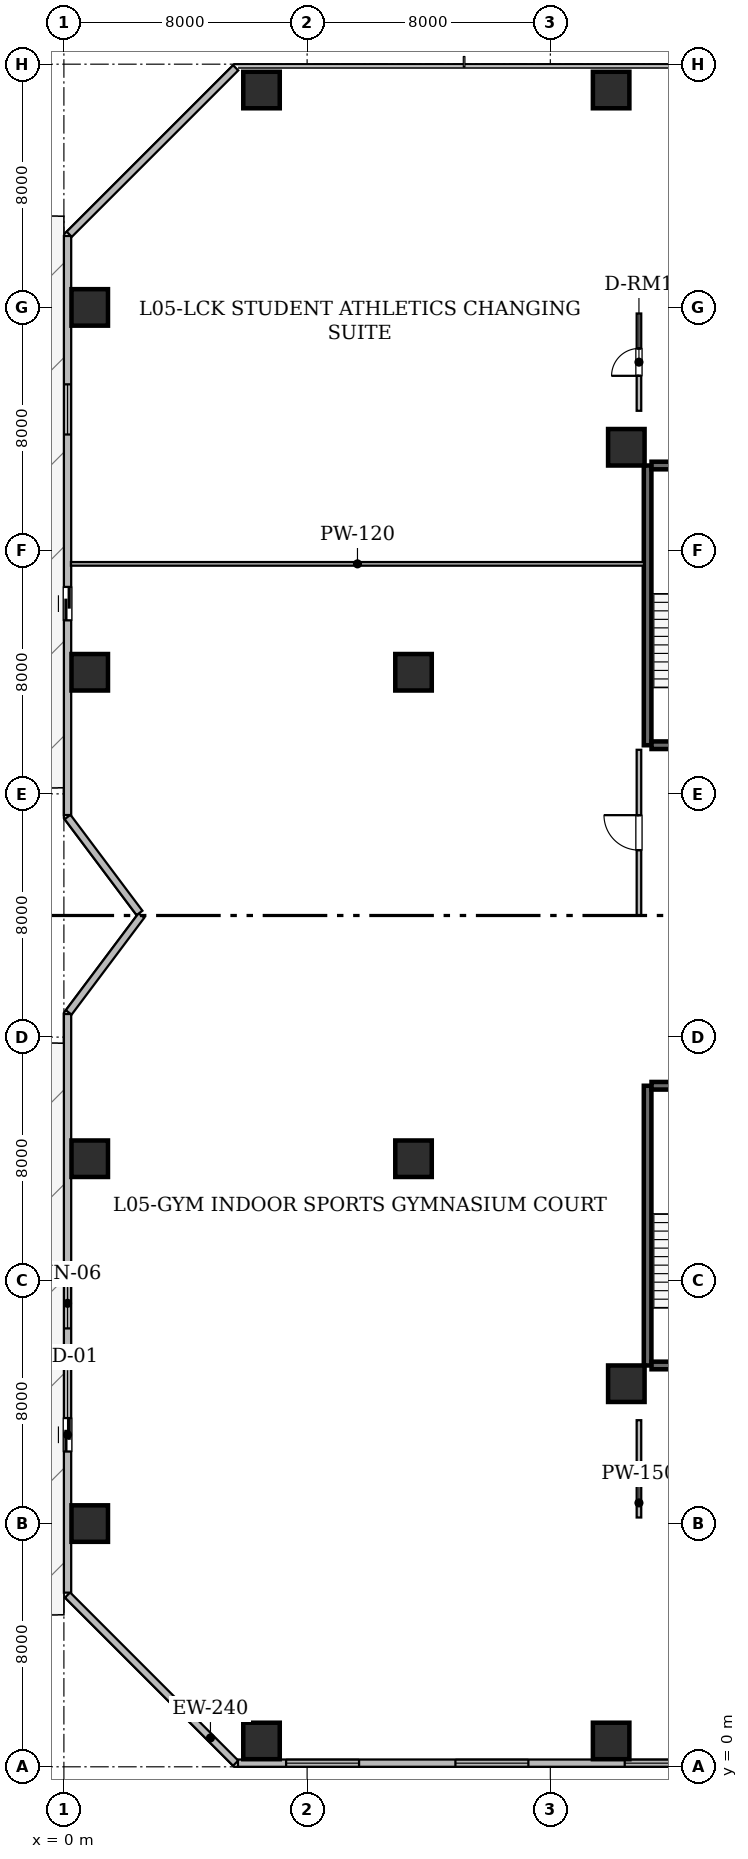
"""IFC4 building model, lengths in metres.
Left out: names, types, materials, properties, quantities, classifications, styles, units other than length and angle.
Written with IfcOpenShell. Run it as: python <this file> out.ifc"""

import sys

from ifc_helpers import new_model, si_unit, direction, frame, frame_2d, origin, origin_2d, place, context, subcontext, project, spatial, rectangle, hollow_rectangle, extrude, element, fill, save


model = new_model("IFC4")
c1 = context("Model", 3, precision=1e-05, world=origin(), true_north=direction((0.0, 1.0)))
c2 = subcontext(c1, "Body", "Model", "MODEL_VIEW")
j1 = project(units=[si_unit("LENGTHUNIT", "METRE"), si_unit("PLANEANGLEUNIT", "RADIAN")], contexts=[c1])
p1 = place(None, origin())
s1 = spatial("IfcSite", under=j1, at=p1, CompositionType="ELEMENT")
p2 = place(p1, origin())
s2 = spatial("IfcBuilding", under=s1, at=p2, CompositionType="ELEMENT")
p3 = place(p2, frame((0.0, 0.0, 24.6)))
s3 = spatial("IfcBuildingStorey", under=s2, at=p3, CompositionType="ELEMENT", Elevation=24.6)
for number, where, z_axis, x_axis in (
    (1, (6.5, 0.85, 0.0), (0.0, 0.0, 1.0), (1.0, 0.0, 0.0)),
    (2, (18.0, 0.85, 0.0), (0.0, 0.0, 1.0), (1.0, 0.0, 0.0)),
    (3, (6.5, 55.15, 0.0), (0.0, 0.0, 1.0), (1.0, 0.0, 0.0)),
    (4, (18.0, 55.15, 0.0), (0.0, 0.0, 1.0), (1.0, 0.0, 0.0)),
    (5, (0.85, 8.0, 0.0), (0.0, 0.0, 1.0), (1.0, 0.0, 0.0)),
    (6, (0.85, 20.0, 0.0), (0.0, 0.0, 1.0), (1.0, 0.0, 0.0)),
    (7, (0.85, 36.0, 0.0), (0.0, 0.0, 1.0), (1.0, 0.0, 0.0)),
    (8, (0.85, 48.0, 0.0), (0.0, 0.0, 1.0), (1.0, 0.0, 0.0)),
    (9, (18.5, 12.6, 0.0), (0.0, 0.0, 1.0), (1.0, 0.0, 0.0)),
    (10, (18.5, 43.4, 0.0), (0.0, 0.0, 1.0), (1.0, 0.0, 0.0)),
    (11, (11.5, 20.0, 0.0), (0.0, 0.0, 1.0), (1.0, 0.0, 0.0)),
    (12, (11.5, 36.0, 0.0), (0.0, 0.0, 1.0), (1.0, 0.0, 0.0)),
):
    element("IfcColumn", number, at=place(p3, frame(where, z_axis=z_axis, x_axis=x_axis)), inside=s3, PredefinedType="COLUMN", context=c2, shape_type="SweptSolid", body=[
        extrude(hollow_rectangle(XDim=1.2, YDim=1.2, WallThickness=0.06, at=origin_2d()), origin(), (0.0, 0.0, 1.0), 4.2),
    ])
p4 = place(p3, frame((5.65, 0.12, 0.0), z_axis=(0.0, 0.0, 1.0), x_axis=(-0.707106781187, 0.707106781187, 0.0)))
e13 = element("IfcWall", 13, at=p4, inside=s3, PredefinedType="STANDARD", context=c2, shape_type="SweptSolid", body=[
    extrude(rectangle(XDim=7.82, YDim=0.24, at=frame_2d((3.91, 0.0))), origin(), (0.0, 0.0, 1.0), 3.92),
])
p5 = place(p3, frame((0.12, 5.728, 0.0), z_axis=(0.0, 0.0, 1.0), x_axis=(0.0, 1.0, 0.0)))
e14 = element("IfcWall", 14, at=p5, inside=s3, PredefinedType="STANDARD", context=c2, shape_type="SweptSolid", body=[
    extrude(rectangle(XDim=19.032, YDim=0.24, at=frame_2d((9.516, 0.0))), origin(), (0.0, 0.0, 1.0), 3.92),
])
p6 = place(p5, frame((4.642, 0.0, 0.0)))
e15 = element("IfcOpeningElement", 15, at=p6, cuts=e14, PredefinedType="OPENING", context=c2, shape_type="SweptSolid", body=[
    extrude(rectangle(XDim=1.1, YDim=2.2, at=frame_2d((0.55, 1.1))), frame((0.0, 0.13, 0.0), z_axis=(0.0, -1.0, 0.0), x_axis=(1.0, 0.0, 0.0)), (0.0, 0.0, 1.0), 0.26),
])
p7 = place(p5, frame((8.691, 0.0, 0.85)))
e16 = element("IfcOpeningElement", 16, at=p7, cuts=e14, PredefinedType="OPENING", context=c2, shape_type="SweptSolid", body=[
    extrude(rectangle(XDim=1.65, YDim=1.55, at=frame_2d((0.825, 0.775))), frame((0.0, 0.13, 0.0), z_axis=(0.0, -1.0, 0.0), x_axis=(1.0, 0.0, 0.0)), (0.0, 0.0, 1.0), 0.26),
])
p8 = place(p3, frame((0.158, 24.811, 0.0), z_axis=(0.0, 0.0, 1.0), x_axis=(0.600058791648, 0.799955902889, 0.0)))
e17 = element("IfcWall", 17, at=p8, inside=s3, PredefinedType="STANDARD", context=c2, shape_type="SweptSolid", body=[
    extrude(rectangle(XDim=3.986, YDim=0.24, at=frame_2d((1.993, 0.0))), origin(), (0.0, 0.0, 1.0), 3.92),
])
p9 = place(p3, frame((2.487, 28.084, 0.0), z_axis=(0.0, 0.0, 1.0), x_axis=(-0.599990098106, 0.800007426325, 0.0)))
e18 = element("IfcWall", 18, at=p9, inside=s3, PredefinedType="STANDARD", context=c2, shape_type="SweptSolid", body=[
    extrude(rectangle(XDim=3.945, YDim=0.24, at=frame_2d((1.973, 0.0))), origin(), (0.0, 0.0, 1.0), 3.92),
])
p10 = place(p3, frame((0.12, 31.304, 0.0), z_axis=(0.0, 0.0, 1.0), x_axis=(0.0, 1.0, 0.0)))
e19 = element("IfcWall", 19, at=p10, inside=s3, PredefinedType="STANDARD", context=c2, shape_type="SweptSolid", body=[
    extrude(rectangle(XDim=19.046, YDim=0.24, at=frame_2d((9.523, 0.0))), origin(), (0.0, 0.0, 1.0), 3.92),
])
p11 = place(p10, frame((6.403, 0.0, 0.0)))
e20 = element("IfcOpeningElement", 20, at=p11, cuts=e19, PredefinedType="OPENING", context=c2, shape_type="SweptSolid", body=[
    extrude(rectangle(XDim=1.1, YDim=2.2, at=frame_2d((0.55, 1.1))), frame((0.0, 0.13, 0.0), z_axis=(0.0, -1.0, 0.0), x_axis=(1.0, 0.0, 0.0)), (0.0, 0.0, 1.0), 0.26),
])
p12 = place(p10, frame((12.516, 0.0, 0.85)))
e21 = element("IfcOpeningElement", 21, at=p12, cuts=e19, PredefinedType="OPENING", context=c2, shape_type="SweptSolid", body=[
    extrude(rectangle(XDim=1.65, YDim=1.55, at=frame_2d((0.825, 0.775))), frame((0.0, 0.13, 0.0), z_axis=(0.0, -1.0, 0.0), x_axis=(1.0, 0.0, 0.0)), (0.0, 0.0, 1.0), 0.26),
])
p13 = place(p3, frame((0.175, 50.405, 0.0), z_axis=(0.0, 0.0, 1.0), x_axis=(0.707106781187, 0.707106781187, 0.0)))
e22 = element("IfcWall", 22, at=p13, inside=s3, PredefinedType="STANDARD", context=c2, shape_type="SweptSolid", body=[
    extrude(rectangle(XDim=7.743, YDim=0.24, at=frame_2d((3.871, 0.0))), origin(), (0.0, 0.0, 1.0), 3.92),
])
p14 = place(p3, frame((50.275, 0.12, 0.0), z_axis=(0.0, 0.0, 1.0), x_axis=(-1.0, 0.0, 0.0)))
e23 = element("IfcWall", 23, at=p14, inside=s3, PredefinedType="STANDARD", context=c2, shape_type="SweptSolid", body=[
    extrude(rectangle(XDim=44.55, YDim=0.24, at=frame_2d((22.275, 0.0))), origin(), (0.0, 0.0, 1.0), 3.92),
])
p15 = place(p14, frame((1.584, 0.0, 0.9)))
e24 = element("IfcOpeningElement", 24, at=p15, cuts=e23, PredefinedType="OPENING", context=c2, shape_type="SweptSolid", body=[
    extrude(rectangle(XDim=2.4, YDim=1.7, at=frame_2d((1.2, 0.85))), frame((0.0, 0.13, 0.0), z_axis=(0.0, -1.0, 0.0), x_axis=(1.0, 0.0, 0.0)), (0.0, 0.0, 1.0), 0.26),
])
p16 = place(p14, frame((7.153, 0.0, 0.9)))
e25 = element("IfcOpeningElement", 25, at=p16, cuts=e23, PredefinedType="OPENING", context=c2, shape_type="SweptSolid", body=[
    extrude(rectangle(XDim=2.4, YDim=1.7, at=frame_2d((1.2, 0.85))), frame((0.0, 0.13, 0.0), z_axis=(0.0, -1.0, 0.0), x_axis=(1.0, 0.0, 0.0)), (0.0, 0.0, 1.0), 0.26),
])
p17 = place(p14, frame((12.722, 0.0, 0.9)))
e26 = element("IfcOpeningElement", 26, at=p17, cuts=e23, PredefinedType="OPENING", context=c2, shape_type="SweptSolid", body=[
    extrude(rectangle(XDim=2.4, YDim=1.7, at=frame_2d((1.2, 0.85))), frame((0.0, 0.13, 0.0), z_axis=(0.0, -1.0, 0.0), x_axis=(1.0, 0.0, 0.0)), (0.0, 0.0, 1.0), 0.26),
])
p18 = place(p14, frame((18.291, 0.0, 0.9)))
e27 = element("IfcOpeningElement", 27, at=p18, cuts=e23, PredefinedType="OPENING", context=c2, shape_type="SweptSolid", body=[
    extrude(rectangle(XDim=2.4, YDim=1.7, at=frame_2d((1.2, 0.85))), frame((0.0, 0.13, 0.0), z_axis=(0.0, -1.0, 0.0), x_axis=(1.0, 0.0, 0.0)), (0.0, 0.0, 1.0), 0.26),
])
p19 = place(p14, frame((23.859, 0.0, 0.9)))
e28 = element("IfcOpeningElement", 28, at=p19, cuts=e23, PredefinedType="OPENING", context=c2, shape_type="SweptSolid", body=[
    extrude(rectangle(XDim=2.4, YDim=1.7, at=frame_2d((1.2, 0.85))), frame((0.0, 0.13, 0.0), z_axis=(0.0, -1.0, 0.0), x_axis=(1.0, 0.0, 0.0)), (0.0, 0.0, 1.0), 0.26),
])
p20 = place(p14, frame((29.428, 0.0, 0.9)))
e29 = element("IfcOpeningElement", 29, at=p20, cuts=e23, PredefinedType="OPENING", context=c2, shape_type="SweptSolid", body=[
    extrude(rectangle(XDim=2.4, YDim=1.7, at=frame_2d((1.2, 0.85))), frame((0.0, 0.13, 0.0), z_axis=(0.0, -1.0, 0.0), x_axis=(1.0, 0.0, 0.0)), (0.0, 0.0, 1.0), 0.26),
])
p21 = place(p14, frame((34.997, 0.0, 0.9)))
e30 = element("IfcOpeningElement", 30, at=p21, cuts=e23, PredefinedType="OPENING", context=c2, shape_type="SweptSolid", body=[
    extrude(rectangle(XDim=2.4, YDim=1.7, at=frame_2d((1.2, 0.85))), frame((0.0, 0.13, 0.0), z_axis=(0.0, -1.0, 0.0), x_axis=(1.0, 0.0, 0.0)), (0.0, 0.0, 1.0), 0.26),
])
p22 = place(p14, frame((40.566, 0.0, 0.9)))
e31 = element("IfcOpeningElement", 31, at=p22, cuts=e23, PredefinedType="OPENING", context=c2, shape_type="SweptSolid", body=[
    extrude(rectangle(XDim=2.4, YDim=1.7, at=frame_2d((1.2, 0.85))), frame((0.0, 0.13, 0.0), z_axis=(0.0, -1.0, 0.0), x_axis=(1.0, 0.0, 0.0)), (0.0, 0.0, 1.0), 0.26),
])
p23 = place(p3, frame((19.2, 13.2, 0.0), z_axis=(0.0, 0.0, 1.0), x_axis=(0.0, 1.0, 0.0)))
e32 = element("IfcWall", 32, at=p23, inside=s3, PredefinedType="SHEAR", context=c2, shape_type="SweptSolid", body=[
    extrude(rectangle(XDim=9.2, YDim=0.25, at=frame_2d((4.6, 0.0))), origin(), (0.0, 0.0, 1.0), 3.92),
])
for number, where, z_axis, x_axis in (
    (33, (19.329, 13.2, 0.0), (0.0, 0.0, 1.0), (1.0, 0.0, 0.0)),
    (34, (19.329, 22.4, 0.0), (0.0, 0.0, 1.0), (1.0, 0.0, 0.0)),
):
    element("IfcWall", number, at=place(p3, frame(where, z_axis=z_axis, x_axis=x_axis)), inside=s3, PredefinedType="SHEAR", context=c2, shape_type="SweptSolid", body=[
        extrude(rectangle(XDim=3.692, YDim=0.25, at=frame_2d((1.846, 0.0))), origin(), (0.0, 0.0, 1.0), 3.92),
    ])
p24 = place(p3, frame((19.2, 33.6, 0.0), z_axis=(0.0, 0.0, 1.0), x_axis=(0.0, 1.0, 0.0)))
e35 = element("IfcWall", 35, at=p24, inside=s3, PredefinedType="SHEAR", context=c2, shape_type="SweptSolid", body=[
    extrude(rectangle(XDim=9.2, YDim=0.25, at=frame_2d((4.6, 0.0))), origin(), (0.0, 0.0, 1.0), 3.92),
])
for number, where, z_axis, x_axis in (
    (36, (19.329, 33.6, 0.0), (0.0, 0.0, 1.0), (1.0, 0.0, 0.0)),
    (37, (19.329, 42.8, 0.0), (0.0, 0.0, 1.0), (1.0, 0.0, 0.0)),
):
    element("IfcWall", number, at=place(p3, frame(where, z_axis=z_axis, x_axis=x_axis)), inside=s3, PredefinedType="SHEAR", context=c2, shape_type="SweptSolid", body=[
        extrude(rectangle(XDim=3.692, YDim=0.25, at=frame_2d((1.846, 0.0))), origin(), (0.0, 0.0, 1.0), 3.92),
    ])
p25 = place(p3, frame((18.915, 28.0, 0.0), z_axis=(0.0, 0.0, 1.0), x_axis=(0.0, 1.0, 0.0)))
e38 = element("IfcWall", 38, at=p25, inside=s3, PredefinedType="STANDARD", context=c2, shape_type="SweptSolid", body=[
    extrude(rectangle(XDim=5.45, YDim=0.15, at=frame_2d((2.725, 0.0))), origin(), (0.0, 0.0, 1.0), 3.92),
])
p26 = place(p25, frame((2.15, 0.0, 0.0)))
e39 = element("IfcOpeningElement", 39, at=p26, cuts=e38, PredefinedType="OPENING", context=c2, shape_type="SweptSolid", body=[
    extrude(rectangle(XDim=1.15, YDim=2.2, at=frame_2d((0.575, 1.1))), frame((0.0, 0.085, 0.0), z_axis=(0.0, -1.0, 0.0), x_axis=(1.0, 0.0, 0.0)), (0.0, 0.0, 1.0), 0.17),
])
p27 = place(p3, frame((18.915, 8.2, 0.0), z_axis=(0.0, 0.0, 1.0), x_axis=(0.0, 1.0, 0.0)))
e40 = element("IfcWall", 40, at=p27, inside=s3, PredefinedType="STANDARD", context=c2, shape_type="SweptSolid", body=[
    extrude(rectangle(XDim=3.2, YDim=0.15, at=frame_2d((1.6, 0.0))), origin(), (0.0, 0.0, 1.0), 3.92),
])
p28 = place(p3, frame((18.915, 44.6, 0.0), z_axis=(0.0, 0.0, 1.0), x_axis=(0.0, 1.0, 0.0)))
e41 = element("IfcWall", 41, at=p28, inside=s3, PredefinedType="STANDARD", context=c2, shape_type="SweptSolid", body=[
    extrude(rectangle(XDim=3.2, YDim=0.15, at=frame_2d((1.6, 0.0))), origin(), (0.0, 0.0, 1.0), 3.92),
])
p29 = place(p28, frame((1.15, 0.0, 0.0)))
e42 = element("IfcOpeningElement", 42, at=p29, cuts=e41, PredefinedType="OPENING", context=c2, shape_type="SweptSolid", body=[
    extrude(rectangle(XDim=0.9, YDim=2.1, at=frame_2d((0.45, 1.05))), frame((0.0, 0.085, 0.0), z_axis=(0.0, -1.0, 0.0), x_axis=(1.0, 0.0, 0.0)), (0.0, 0.0, 1.0), 0.17),
])
p30 = place(p3, frame((0.232, 39.565, 0.0), z_axis=(0.0, 0.0, 1.0), x_axis=(1.0, 0.0, 0.0)))
e43 = element("IfcWall", 43, at=p30, inside=s3, PredefinedType="PARTITIONING", context=c2, shape_type="SweptSolid", body=[
    extrude(rectangle(XDim=18.849, YDim=0.12, at=frame_2d((9.425, 0.0))), origin(), (0.0, 0.0, 1.0), 3.055),
])
p31 = place(p6, origin())
e44 = element("IfcDoor", 44, at=p31, inside=s3, OperationType="SLIDING_TO_LEFT", PredefinedType="DOOR", context=c2, shape_type="SweptSolid", body=[
    extrude(rectangle(XDim=1.1, YDim=2.2, at=frame_2d((0.55, 1.1))), frame((0.0, 0.025, 0.0), z_axis=(0.0, -1.0, 0.0), x_axis=(1.0, 0.0, 0.0)), (0.0, 0.0, 1.0), 0.05),
])
fill(e15, e44)
p32 = place(p11, origin())
e45 = element("IfcDoor", 45, at=p32, inside=s3, OperationType="SLIDING_TO_LEFT", PredefinedType="DOOR", context=c2, shape_type="SweptSolid", body=[
    extrude(rectangle(XDim=1.1, YDim=2.2, at=frame_2d((0.55, 1.1))), frame((0.0, 0.025, 0.0), z_axis=(0.0, -1.0, 0.0), x_axis=(1.0, 0.0, 0.0)), (0.0, 0.0, 1.0), 0.05),
])
fill(e20, e45)
p33 = place(p7, origin())
e46 = element("IfcWindow", 46, at=p33, inside=s3, PartitioningType="SINGLE_PANEL", PredefinedType="WINDOW", context=c2, shape_type="SweptSolid", body=[
    extrude(rectangle(XDim=1.65, YDim=1.55, at=frame_2d((0.825, 0.775))), frame((0.0, 0.03, 0.0), z_axis=(0.0, -1.0, 0.0), x_axis=(1.0, 0.0, 0.0)), (0.0, 0.0, 1.0), 0.06),
])
fill(e16, e46)
p34 = place(p12, origin())
e47 = element("IfcWindow", 47, at=p34, inside=s3, PartitioningType="SINGLE_PANEL", PredefinedType="WINDOW", context=c2, shape_type="SweptSolid", body=[
    extrude(rectangle(XDim=1.65, YDim=1.55, at=frame_2d((0.825, 0.775))), frame((0.0, 0.03, 0.0), z_axis=(0.0, -1.0, 0.0), x_axis=(1.0, 0.0, 0.0)), (0.0, 0.0, 1.0), 0.06),
])
fill(e21, e47)
p35 = place(p20, origin())
e48 = element("IfcWindow", 48, at=p35, inside=s3, PartitioningType="SINGLE_PANEL", PredefinedType="WINDOW", context=c2, shape_type="SweptSolid", body=[
    extrude(rectangle(XDim=2.4, YDim=1.7, at=frame_2d((1.2, 0.85))), frame((0.0, 0.03, 0.0), z_axis=(0.0, -1.0, 0.0), x_axis=(1.0, 0.0, 0.0)), (0.0, 0.0, 1.0), 0.06),
])
fill(e29, e48)
p36 = place(p21, origin())
e49 = element("IfcWindow", 49, at=p36, inside=s3, PartitioningType="SINGLE_PANEL", PredefinedType="WINDOW", context=c2, shape_type="SweptSolid", body=[
    extrude(rectangle(XDim=2.4, YDim=1.7, at=frame_2d((1.2, 0.85))), frame((0.0, 0.03, 0.0), z_axis=(0.0, -1.0, 0.0), x_axis=(1.0, 0.0, 0.0)), (0.0, 0.0, 1.0), 0.06),
])
fill(e30, e49)
p37 = place(p22, origin())
e50 = element("IfcWindow", 50, at=p37, inside=s3, PartitioningType="SINGLE_PANEL", PredefinedType="WINDOW", context=c2, shape_type="SweptSolid", body=[
    extrude(rectangle(XDim=2.4, YDim=1.7, at=frame_2d((1.2, 0.85))), frame((0.0, 0.03, 0.0), z_axis=(0.0, -1.0, 0.0), x_axis=(1.0, 0.0, 0.0)), (0.0, 0.0, 1.0), 0.06),
])
fill(e31, e50)
p38 = place(p26, origin())
e51 = element("IfcDoor", 51, at=p38, inside=s3, OperationType="SINGLE_SWING_RIGHT", PredefinedType="DOOR", context=c2, shape_type="SweptSolid", body=[
    extrude(rectangle(XDim=1.15, YDim=2.2, at=frame_2d((0.575, 1.1))), frame((0.0, 0.025, 0.0), z_axis=(0.0, -1.0, 0.0), x_axis=(1.0, 0.0, 0.0)), (0.0, 0.0, 1.0), 0.05),
])
fill(e39, e51)
p39 = place(p29, origin())
e52 = element("IfcDoor", 52, at=p39, inside=s3, OperationType="SINGLE_SWING_LEFT", PredefinedType="DOOR", context=c2, shape_type="SweptSolid", body=[
    extrude(rectangle(XDim=0.9, YDim=2.1, at=frame_2d((0.45, 1.05))), frame((0.0, 0.025, 0.0), z_axis=(0.0, -1.0, 0.0), x_axis=(1.0, 0.0, 0.0)), (0.0, 0.0, 1.0), 0.05),
])
fill(e42, e52)
save(model, sys.argv[1])
